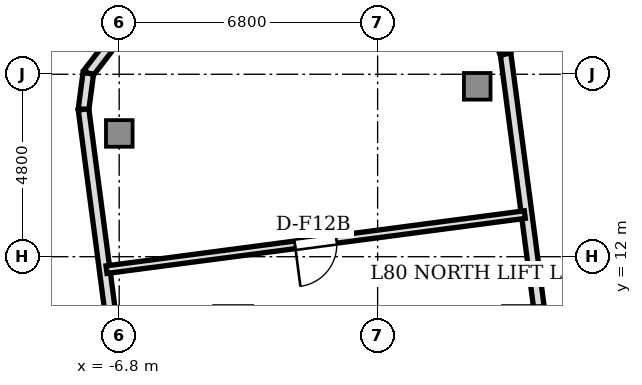
"""IFC4 building model, lengths in metres.
Left out: names, types, materials, properties, quantities, classifications, styles, units other than length and angle.
Written with IfcOpenShell. Run it as: python <this file> out.ifc"""

import sys

from ifc_helpers import new_model, si_unit, direction, frame, frame_2d, origin, origin_2d, place, context, subcontext, project, spatial, rectangle, extrude, source, transform, mapped, element, fill, save


model = new_model("IFC4")
c1 = context("Model", 3, precision=1e-05, world=origin(), true_north=direction((0.0, 1.0)))
c2 = subcontext(c1, "Body", "Model", "MODEL_VIEW")
j1 = project(units=[si_unit("LENGTHUNIT", "METRE"), si_unit("PLANEANGLEUNIT", "RADIAN")], contexts=[c1])
p1 = place(None, origin())
s1 = spatial("IfcSite", under=j1, at=p1, CompositionType="ELEMENT")
p2 = place(p1, origin())
s2 = spatial("IfcBuilding", under=s1, at=p2, CompositionType="ELEMENT")
p3 = place(p2, frame((0.0, 0.0, 288.9)))
s3 = spatial("IfcBuildingStorey", under=s2, at=p3, CompositionType="ELEMENT", Elevation=288.9)
m1 = source(origin(), c2, "Body", "SweptSolid", [
    extrude(rectangle(XDim=0.7, YDim=0.7, at=origin_2d()), origin(), (0.0, 0.0, 1.0), 3.5),
])
for number, where, z_axis, x_axis in (
    (1, (2.621, 16.483, 0.0), (0.0, 0.0, 1.0), (1.0, 0.0, 0.0)),
    (2, (-6.798, 15.243, 0.0), (0.0, 0.0, 1.0), (1.0, 0.0, 0.0)),
):
    element("IfcColumn", number, at=place(p3, frame(where, z_axis=z_axis, x_axis=x_axis)), inside=s3, PredefinedType="COLUMN", context=c2, shape_type="MappedRepresentation", body=[
        mapped(m1, transform((0.0, 0.0, 0.0), scale=1.0)),
    ])
p4 = place(p3, frame((4.821, 6.283, 0.0), z_axis=(0.0, 0.0, 1.0), x_axis=(-0.130521347626, 0.991445499165, 0.0)))
e3 = element("IfcWall", 3, at=p4, inside=s3, PredefinedType="SOLIDWALL", context=c2, shape_type="SweptSolid", body=[
    extrude(rectangle(XDim=11.15, YDim=0.28, at=frame_2d((5.575, 0.0))), origin(), (0.0, 0.0, 1.0), 3.5),
])
p5 = place(p3, frame((3.366, 17.338, 0.0), z_axis=(0.0, 0.0, 1.0), x_axis=(-0.382659506909, 0.923889442397, 0.0)))
e4 = element("IfcWall", 4, at=p5, inside=s3, PredefinedType="SOLIDWALL", context=c2, shape_type="SweptSolid", body=[
    extrude(rectangle(XDim=0.958, YDim=0.28, at=frame_2d((0.479, 0.0))), origin(), (0.0, 0.0, 1.0), 3.5),
])
p6 = place(p3, frame((-7.031, 17.585, 0.0), z_axis=(0.0, 0.0, 1.0), x_axis=(-0.60861352168, -0.793466811674, 0.0)))
e5 = element("IfcWall", 5, at=p6, inside=s3, PredefinedType="SOLIDWALL", context=c2, shape_type="SweptSolid", body=[
    extrude(rectangle(XDim=0.958, YDim=0.28, at=frame_2d((0.479, 0.0))), origin(), (0.0, 0.0, 1.0), 3.5),
])
p7 = place(p3, frame((-7.613, 16.825, 0.0), z_axis=(0.0, 0.0, 1.0), x_axis=(-0.130527053476, -0.991444747987, 0.0)))
e6 = element("IfcWall", 6, at=p7, inside=s3, PredefinedType="SOLIDWALL", context=c2, shape_type="SweptSolid", body=[
    extrude(rectangle(XDim=0.958, YDim=0.28, at=frame_2d((0.479, 0.0))), origin(), (0.0, 0.0, 1.0), 3.5),
])
p8 = place(p3, frame((-7.738, 15.876, 0.0), z_axis=(0.0, 0.0, 1.0), x_axis=(0.130521347626, -0.991445499165, 0.0)))
e7 = element("IfcWall", 7, at=p8, inside=s3, PredefinedType="SOLIDWALL", context=c2, shape_type="SweptSolid", body=[
    extrude(rectangle(XDim=11.15, YDim=0.28, at=frame_2d((5.575, 0.0))), origin(), (0.0, 0.0, 1.0), 3.5),
])
p9 = place(p3, frame((3.872, 13.108, 0.0), z_axis=(0.0, 0.0, 1.0), x_axis=(-0.991443437127, -0.130537009991, 0.0)))
e8 = element("IfcWall", 8, at=p9, inside=s3, PredefinedType="SOLIDWALL", context=c2, shape_type="SweptSolid", body=[
    extrude(rectangle(XDim=11.1, YDim=0.2, at=frame_2d((5.55, 0.0))), origin(), (0.0, 0.0, 1.0), 3.05),
])
p10 = place(p9, frame((5.0, 0.0, 0.0)))
e9 = element("IfcOpeningElement", 9, at=p10, cuts=e8, PredefinedType="OPENING", context=c2, shape_type="SweptSolid", body=[
    extrude(rectangle(XDim=1.1, YDim=2.15, at=frame_2d((0.55, 1.075))), frame((0.0, 0.11, 0.0), z_axis=(0.0, -1.0, 0.0), x_axis=(1.0, 0.0, 0.0)), (0.0, 0.0, 1.0), 0.22),
])
m2 = source(origin(), c2, "Body", "SweptSolid", [
    extrude(rectangle(XDim=1.1, YDim=0.05, at=origin_2d()), origin(), (0.0, 0.0, 1.0), 2.15),
])
p11 = place(p10, frame((0.55, 0.0, 0.0)))
e10 = element("IfcDoor", 10, at=p11, inside=s3, OperationType="SINGLE_SWING_RIGHT", PredefinedType="DOOR", context=c2, shape_type="MappedRepresentation", body=[
    mapped(m2, transform((0.0, 0.0, 0.0), scale=1.0)),
])
fill(e9, e10)
save(model, sys.argv[1])
